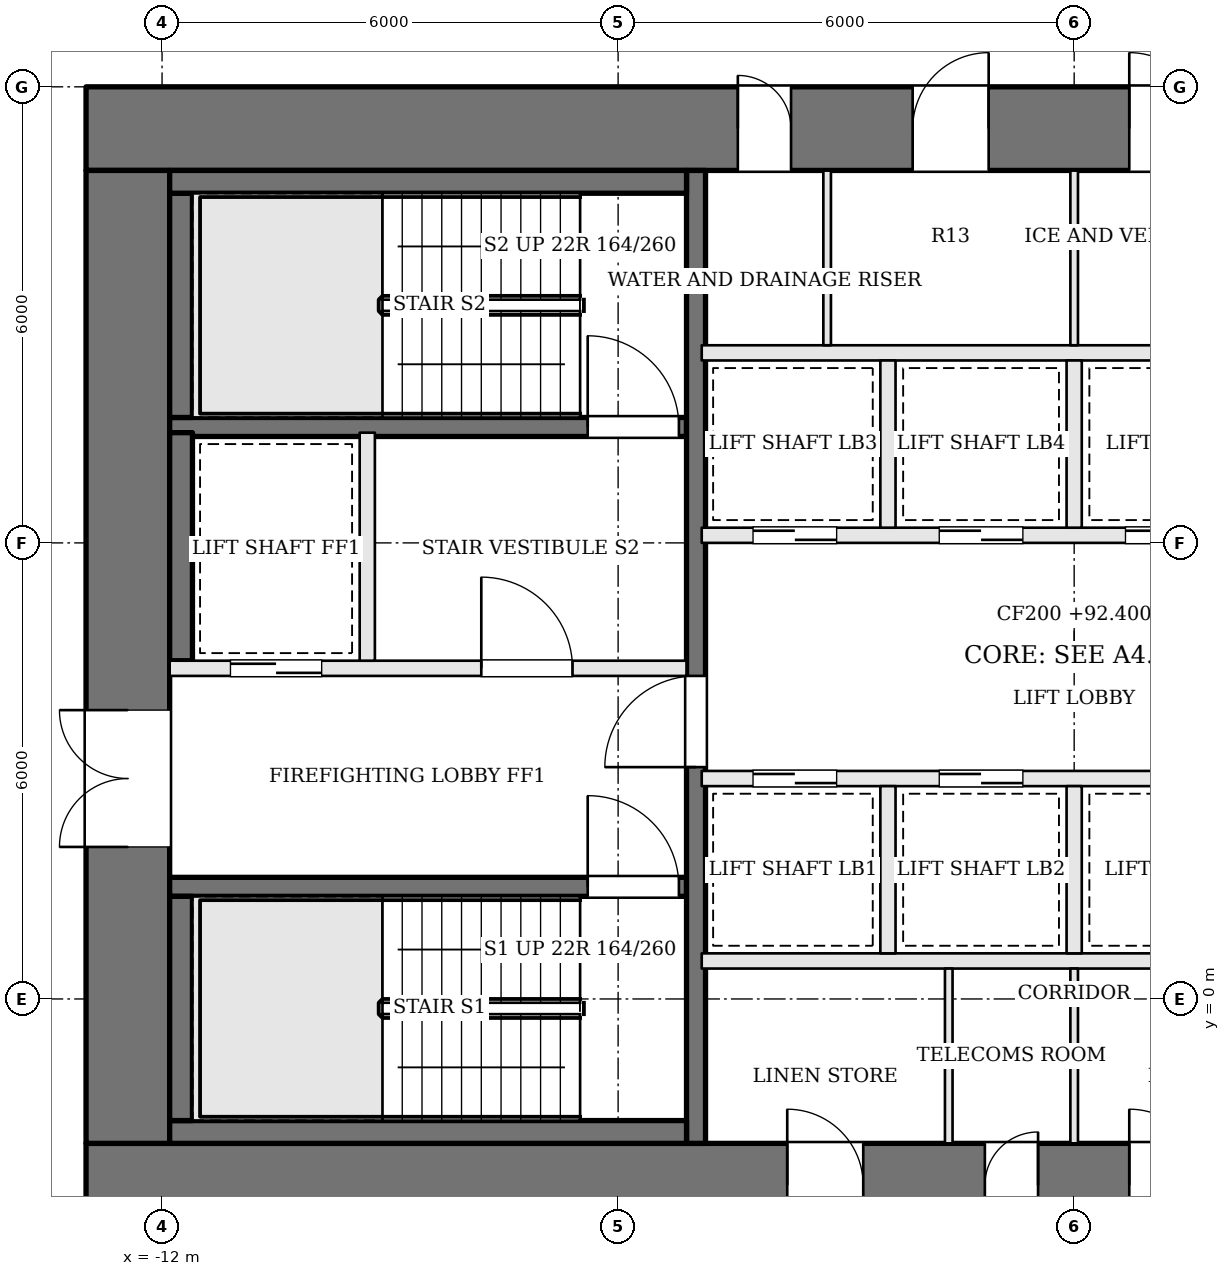
"""IFC4 building model, lengths in metres.
Left out: names, types, materials, properties, quantities, classifications, styles, units other than length and angle.
Written with IfcOpenShell. Run it as: python <this file> out.ifc"""

import sys

from ifc_helpers import new_model, si_unit, direction, frame, frame_2d, origin, place, context, subcontext, project, spatial, rectangle, extrude, element, fill, save


model = new_model("IFC4")
c1 = context("Model", 3, precision=1e-05, world=origin(), true_north=direction((0.0, 1.0)))
c2 = subcontext(c1, "Body", "Model", "MODEL_VIEW")
j1 = project(units=[si_unit("LENGTHUNIT", "METRE"), si_unit("PLANEANGLEUNIT", "RADIAN")], contexts=[c1])
p1 = place(None, origin())
s1 = spatial("IfcSite", under=j1, at=p1, CompositionType="ELEMENT")
p2 = place(p1, origin())
s2 = spatial("IfcBuilding", under=s1, at=p2, CompositionType="ELEMENT")
p3 = place(p2, frame((0.0, 0.0, 92.4)))
s3 = spatial("IfcBuildingStorey", under=s2, at=p3, CompositionType="ELEMENT", Elevation=92.4)
p4 = place(p3, frame((-13.0, 11.45, 0.0), z_axis=(0.0, 0.0, 1.0), x_axis=(1.0, 0.0, 0.0)))
e1 = element("IfcWall", 1, at=p4, inside=s3, PredefinedType="SHEAR", context=c2, shape_type="SweptSolid", body=[
    extrude(rectangle(XDim=26.0, YDim=1.1, at=frame_2d((13.0, 0.0))), origin(), (0.0, 0.0, 1.0), 3.6),
])
p5 = place(p4, frame((8.575, 0.0, 0.0)))
e2 = element("IfcOpeningElement", 2, at=p5, cuts=e1, PredefinedType="OPENING", context=c2, shape_type="SweptSolid", body=[
    extrude(rectangle(XDim=0.7, YDim=2.1, at=frame_2d((0.35, 1.05))), frame((0.0, 0.56, 0.0), z_axis=(0.0, -1.0, 0.0), x_axis=(1.0, 0.0, 0.0)), (0.0, 0.0, 1.0), 1.12),
])
p6 = place(p4, frame((10.875, 0.0, 0.0)))
e3 = element("IfcOpeningElement", 3, at=p6, cuts=e1, PredefinedType="OPENING", context=c2, shape_type="SweptSolid", body=[
    extrude(rectangle(XDim=1.0, YDim=2.1, at=frame_2d((0.5, 1.05))), frame((0.0, 0.56, 0.0), z_axis=(0.0, -1.0, 0.0), x_axis=(1.0, 0.0, 0.0)), (0.0, 0.0, 1.0), 1.12),
])
p7 = place(p4, frame((13.725, 0.0, 0.0)))
e4 = element("IfcOpeningElement", 4, at=p7, cuts=e1, PredefinedType="OPENING", context=c2, shape_type="SweptSolid", body=[
    extrude(rectangle(XDim=1.0, YDim=2.1, at=frame_2d((0.5, 1.05))), frame((0.0, 0.56, 0.0), z_axis=(0.0, -1.0, 0.0), x_axis=(1.0, 0.0, 0.0)), (0.0, 0.0, 1.0), 1.12),
])
p8 = place(p4, frame((16.175, 0.0, 0.0)))
e5 = element("IfcOpeningElement", 5, at=p8, cuts=e1, PredefinedType="OPENING", context=c2, shape_type="SweptSolid", body=[
    extrude(rectangle(XDim=1.0, YDim=2.1, at=frame_2d((0.5, 1.05))), frame((0.0, 0.56, 0.0), z_axis=(0.0, -1.0, 0.0), x_axis=(1.0, 0.0, 0.0)), (0.0, 0.0, 1.0), 1.12),
])
p9 = place(p3, frame((-13.0, -2.45, 0.0), z_axis=(0.0, 0.0, 1.0), x_axis=(1.0, 0.0, 0.0)))
e6 = element("IfcWall", 6, at=p9, inside=s3, PredefinedType="SHEAR", context=c2, shape_type="SweptSolid", body=[
    extrude(rectangle(XDim=26.0, YDim=1.1, at=frame_2d((13.0, 0.0))), origin(), (0.0, 0.0, 1.0), 3.6),
])
p10 = place(p9, frame((9.225, 0.0, 0.0)))
e7 = element("IfcOpeningElement", 7, at=p10, cuts=e6, PredefinedType="OPENING", context=c2, shape_type="SweptSolid", body=[
    extrude(rectangle(XDim=1.0, YDim=2.1, at=frame_2d((0.5, 1.05))), frame((0.0, 0.56, 0.0), z_axis=(0.0, -1.0, 0.0), x_axis=(1.0, 0.0, 0.0)), (0.0, 0.0, 1.0), 1.12),
])
p11 = place(p9, frame((11.825, 0.0, 0.0)))
e8 = element("IfcOpeningElement", 8, at=p11, cuts=e6, PredefinedType="OPENING", context=c2, shape_type="SweptSolid", body=[
    extrude(rectangle(XDim=0.7, YDim=2.1, at=frame_2d((0.35, 1.05))), frame((0.0, 0.56, 0.0), z_axis=(0.0, -1.0, 0.0), x_axis=(1.0, 0.0, 0.0)), (0.0, 0.0, 1.0), 1.12),
])
p12 = place(p9, frame((13.725, 0.0, 0.0)))
e9 = element("IfcOpeningElement", 9, at=p12, cuts=e6, PredefinedType="OPENING", context=c2, shape_type="SweptSolid", body=[
    extrude(rectangle(XDim=1.0, YDim=2.1, at=frame_2d((0.5, 1.05))), frame((0.0, 0.56, 0.0), z_axis=(0.0, -1.0, 0.0), x_axis=(1.0, 0.0, 0.0)), (0.0, 0.0, 1.0), 1.12),
])
p13 = place(p9, frame((16.225, 0.0, 0.0)))
e10 = element("IfcOpeningElement", 10, at=p13, cuts=e6, PredefinedType="OPENING", context=c2, shape_type="SweptSolid", body=[
    extrude(rectangle(XDim=0.9, YDim=2.1, at=frame_2d((0.45, 1.05))), frame((0.0, 0.56, 0.0), z_axis=(0.0, -1.0, 0.0), x_axis=(1.0, 0.0, 0.0)), (0.0, 0.0, 1.0), 1.12),
])
p14 = place(p3, frame((-12.45, -1.9, 0.0), z_axis=(0.0, 0.0, 1.0), x_axis=(0.0, 1.0, 0.0)))
e11 = element("IfcWall", 11, at=p14, inside=s3, PredefinedType="SHEAR", context=c2, shape_type="SweptSolid", body=[
    extrude(rectangle(XDim=12.8, YDim=1.1, at=frame_2d((6.4, 0.0))), origin(), (0.0, 0.0, 1.0), 3.6),
])
p15 = place(p14, frame((3.9, 0.0, 0.0)))
e12 = element("IfcOpeningElement", 12, at=p15, cuts=e11, PredefinedType="OPENING", context=c2, shape_type="SweptSolid", body=[
    extrude(rectangle(XDim=1.8, YDim=2.1, at=frame_2d((0.9, 1.05))), frame((0.0, 0.56, 0.0), z_axis=(0.0, -1.0, 0.0), x_axis=(1.0, 0.0, 0.0)), (0.0, 0.0, 1.0), 1.12),
])
p16 = place(p3, frame((-11.9, 1.475, 0.0), z_axis=(0.0, 0.0, 1.0), x_axis=(1.0, 0.0, 0.0)))
e13 = element("IfcWall", 13, at=p16, inside=s3, PredefinedType="SOLIDWALL", context=c2, shape_type="SweptSolid", body=[
    extrude(rectangle(XDim=6.8, YDim=0.25, at=frame_2d((3.4, 0.0))), origin(), (0.0, 0.0, 1.0), 3.4),
])
p17 = place(p16, frame((5.5, 0.0, 0.0)))
e14 = element("IfcOpeningElement", 14, at=p17, cuts=e13, PredefinedType="OPENING", context=c2, shape_type="SweptSolid", body=[
    extrude(rectangle(XDim=1.2, YDim=2.1, at=frame_2d((0.6, 1.05))), frame((0.0, 0.135, 0.0), z_axis=(0.0, -1.0, 0.0), x_axis=(1.0, 0.0, 0.0)), (0.0, 0.0, 1.0), 0.27),
])
p18 = place(p3, frame((-11.9, 4.35, 0.0), z_axis=(0.0, 0.0, 1.0), x_axis=(1.0, 0.0, 0.0)))
e15 = element("IfcWall", 15, at=p18, inside=s3, PredefinedType="SOLIDWALL", context=c2, shape_type="SweptSolid", body=[
    extrude(rectangle(XDim=6.8, YDim=0.2, at=frame_2d((3.4, 0.0))), origin(), (0.0, 0.0, 1.0), 3.4),
])
p19 = place(p18, frame((4.1, 0.0, 0.0)))
e16 = element("IfcOpeningElement", 16, at=p19, cuts=e15, PredefinedType="OPENING", context=c2, shape_type="SweptSolid", body=[
    extrude(rectangle(XDim=1.2, YDim=2.1, at=frame_2d((0.6, 1.05))), frame((0.0, 0.11, 0.0), z_axis=(0.0, -1.0, 0.0), x_axis=(1.0, 0.0, 0.0)), (0.0, 0.0, 1.0), 0.22),
])
p20 = place(p18, frame((0.8, 0.0, 0.0)))
e17 = element("IfcOpeningElement", 17, at=p20, cuts=e15, PredefinedType="OPENING", context=c2, shape_type="SweptSolid", body=[
    extrude(rectangle(XDim=1.2, YDim=2.1, at=frame_2d((0.6, 1.05))), frame((0.0, 0.11, 0.0), z_axis=(0.0, -1.0, 0.0), x_axis=(1.0, 0.0, 0.0)), (0.0, 0.0, 1.0), 0.22),
])
p21 = place(p3, frame((-11.9, 7.525, 0.0), z_axis=(0.0, 0.0, 1.0), x_axis=(1.0, 0.0, 0.0)))
e18 = element("IfcWall", 18, at=p21, inside=s3, PredefinedType="SOLIDWALL", context=c2, shape_type="SweptSolid", body=[
    extrude(rectangle(XDim=6.8, YDim=0.25, at=frame_2d((3.4, 0.0))), origin(), (0.0, 0.0, 1.0), 3.4),
])
p22 = place(p21, frame((5.5, 0.0, 0.0)))
e19 = element("IfcOpeningElement", 19, at=p22, cuts=e18, PredefinedType="OPENING", context=c2, shape_type="SweptSolid", body=[
    extrude(rectangle(XDim=1.2, YDim=2.1, at=frame_2d((0.6, 1.05))), frame((0.0, 0.135, 0.0), z_axis=(0.0, -1.0, 0.0), x_axis=(1.0, 0.0, 0.0)), (0.0, 0.0, 1.0), 0.27),
])
p23 = place(p3, frame((-9.3, 4.45, 0.0), z_axis=(0.0, 0.0, 1.0), x_axis=(0.0, 1.0, 0.0)))
e20 = element("IfcWall", 20, at=p23, inside=s3, PredefinedType="SOLIDWALL", context=c2, shape_type="SweptSolid", body=[
    extrude(rectangle(XDim=3.0, YDim=0.2, at=frame_2d((1.5, 0.0))), origin(), (0.0, 0.0, 1.0), 3.4),
])
p24 = place(p3, frame((-4.975, -1.9, 0.0), z_axis=(0.0, 0.0, 1.0), x_axis=(0.0, 1.0, 0.0)))
e21 = element("IfcWall", 21, at=p24, inside=s3, PredefinedType="SOLIDWALL", context=c2, shape_type="SweptSolid", body=[
    extrude(rectangle(XDim=12.8, YDim=0.25, at=frame_2d((6.4, 0.0))), origin(), (0.0, 0.0, 1.0), 3.4),
])
p25 = place(p24, frame((4.95, 0.0, 0.0)))
e22 = element("IfcOpeningElement", 22, at=p25, cuts=e21, PredefinedType="OPENING", context=c2, shape_type="SweptSolid", body=[
    extrude(rectangle(XDim=1.2, YDim=2.1, at=frame_2d((0.6, 1.05))), frame((0.0, 0.135, 0.0), z_axis=(0.0, -1.0, 0.0), x_axis=(1.0, 0.0, 0.0)), (0.0, 0.0, 1.0), 0.27),
])
p26 = place(p3, frame((-11.9, -1.75, 0.0), z_axis=(0.0, 0.0, 1.0), x_axis=(1.0, 0.0, 0.0)))
e23 = element("IfcWall", 23, at=p26, inside=s3, PredefinedType="SOLIDWALL", context=c2, shape_type="SweptSolid", body=[
    extrude(rectangle(XDim=6.8, YDim=0.3, at=frame_2d((3.4, 0.0))), origin(), (0.0, 0.0, 1.0), 3.4),
])
p27 = place(p3, frame((-11.75, -1.6, 0.0), z_axis=(0.0, 0.0, 1.0), x_axis=(0.0, 1.0, 0.0)))
e24 = element("IfcWall", 24, at=p27, inside=s3, PredefinedType="SOLIDWALL", context=c2, shape_type="SweptSolid", body=[
    extrude(rectangle(XDim=2.95, YDim=0.3, at=frame_2d((1.475, 0.0))), origin(), (0.0, 0.0, 1.0), 3.4),
])
p28 = place(p3, frame((-11.75, 4.45, 0.0), z_axis=(0.0, 0.0, 1.0), x_axis=(0.0, 1.0, 0.0)))
e25 = element("IfcWall", 25, at=p28, inside=s3, PredefinedType="SOLIDWALL", context=c2, shape_type="SweptSolid", body=[
    extrude(rectangle(XDim=3.0, YDim=0.3, at=frame_2d((1.5, 0.0))), origin(), (0.0, 0.0, 1.0), 3.4),
])
p29 = place(p3, frame((-11.75, 7.65, 0.0), z_axis=(0.0, 0.0, 1.0), x_axis=(0.0, 1.0, 0.0)))
e26 = element("IfcWall", 26, at=p29, inside=s3, PredefinedType="SOLIDWALL", context=c2, shape_type="SweptSolid", body=[
    extrude(rectangle(XDim=2.95, YDim=0.3, at=frame_2d((1.475, 0.0))), origin(), (0.0, 0.0, 1.0), 3.4),
])
p30 = place(p3, frame((-11.9, 10.75, 0.0), z_axis=(0.0, 0.0, 1.0), x_axis=(1.0, 0.0, 0.0)))
e27 = element("IfcWall", 27, at=p30, inside=s3, PredefinedType="SOLIDWALL", context=c2, shape_type="SweptSolid", body=[
    extrude(rectangle(XDim=6.8, YDim=0.3, at=frame_2d((3.4, 0.0))), origin(), (0.0, 0.0, 1.0), 3.4),
])
p31 = place(p3, frame((-4.9, 0.5, 0.0), z_axis=(0.0, 0.0, 1.0), x_axis=(1.0, 0.0, 0.0)))
e28 = element("IfcWall", 28, at=p31, inside=s3, PredefinedType="SOLIDWALL", context=c2, shape_type="SweptSolid", body=[
    extrude(rectangle(XDim=9.8, YDim=0.2, at=frame_2d((4.9, 0.0))), origin(), (0.0, 0.0, 1.0), 3.4),
])
p32 = place(p3, frame((-4.9, 2.9, 0.0), z_axis=(0.0, 0.0, 1.0), x_axis=(1.0, 0.0, 0.0)))
e29 = element("IfcWall", 29, at=p32, inside=s3, PredefinedType="SOLIDWALL", context=c2, shape_type="SweptSolid", body=[
    extrude(rectangle(XDim=9.8, YDim=0.2, at=frame_2d((4.9, 0.0))), origin(), (0.0, 0.0, 1.0), 3.4),
])
p33 = place(p32, frame((0.675, 0.0, 0.0)))
e30 = element("IfcOpeningElement", 30, at=p33, cuts=e29, PredefinedType="OPENING", context=c2, shape_type="SweptSolid", body=[
    extrude(rectangle(XDim=1.1, YDim=2.1, at=frame_2d((0.55, 1.05))), frame((0.0, 0.11, 0.0), z_axis=(0.0, -1.0, 0.0), x_axis=(1.0, 0.0, 0.0)), (0.0, 0.0, 1.0), 0.22),
])
p34 = place(p32, frame((3.125, 0.0, 0.0)))
e31 = element("IfcOpeningElement", 31, at=p34, cuts=e29, PredefinedType="OPENING", context=c2, shape_type="SweptSolid", body=[
    extrude(rectangle(XDim=1.1, YDim=2.1, at=frame_2d((0.55, 1.05))), frame((0.0, 0.11, 0.0), z_axis=(0.0, -1.0, 0.0), x_axis=(1.0, 0.0, 0.0)), (0.0, 0.0, 1.0), 0.22),
])
p35 = place(p3, frame((-4.9, 6.1, 0.0), z_axis=(0.0, 0.0, 1.0), x_axis=(1.0, 0.0, 0.0)))
e32 = element("IfcWall", 32, at=p35, inside=s3, PredefinedType="SOLIDWALL", context=c2, shape_type="SweptSolid", body=[
    extrude(rectangle(XDim=9.8, YDim=0.2, at=frame_2d((4.9, 0.0))), origin(), (0.0, 0.0, 1.0), 3.4),
])
p36 = place(p35, frame((0.675, 0.0, 0.0)))
e33 = element("IfcOpeningElement", 33, at=p36, cuts=e32, PredefinedType="OPENING", context=c2, shape_type="SweptSolid", body=[
    extrude(rectangle(XDim=1.1, YDim=2.1, at=frame_2d((0.55, 1.05))), frame((0.0, 0.11, 0.0), z_axis=(0.0, -1.0, 0.0), x_axis=(1.0, 0.0, 0.0)), (0.0, 0.0, 1.0), 0.22),
])
p37 = place(p35, frame((3.125, 0.0, 0.0)))
e34 = element("IfcOpeningElement", 34, at=p37, cuts=e32, PredefinedType="OPENING", context=c2, shape_type="SweptSolid", body=[
    extrude(rectangle(XDim=1.1, YDim=2.1, at=frame_2d((0.55, 1.05))), frame((0.0, 0.11, 0.0), z_axis=(0.0, -1.0, 0.0), x_axis=(1.0, 0.0, 0.0)), (0.0, 0.0, 1.0), 0.22),
])
p38 = place(p35, frame((5.575, 0.0, 0.0)))
e35 = element("IfcOpeningElement", 35, at=p38, cuts=e32, PredefinedType="OPENING", context=c2, shape_type="SweptSolid", body=[
    extrude(rectangle(XDim=1.1, YDim=2.1, at=frame_2d((0.55, 1.05))), frame((0.0, 0.11, 0.0), z_axis=(0.0, -1.0, 0.0), x_axis=(1.0, 0.0, 0.0)), (0.0, 0.0, 1.0), 0.22),
])
p39 = place(p35, frame((8.025, 0.0, 0.0)))
e36 = element("IfcOpeningElement", 36, at=p39, cuts=e32, PredefinedType="OPENING", context=c2, shape_type="SweptSolid", body=[
    extrude(rectangle(XDim=1.1, YDim=2.1, at=frame_2d((0.55, 1.05))), frame((0.0, 0.11, 0.0), z_axis=(0.0, -1.0, 0.0), x_axis=(1.0, 0.0, 0.0)), (0.0, 0.0, 1.0), 0.22),
])
p40 = place(p3, frame((-4.9, 8.5, 0.0), z_axis=(0.0, 0.0, 1.0), x_axis=(1.0, 0.0, 0.0)))
e37 = element("IfcWall", 37, at=p40, inside=s3, PredefinedType="SOLIDWALL", context=c2, shape_type="SweptSolid", body=[
    extrude(rectangle(XDim=9.8, YDim=0.2, at=frame_2d((4.9, 0.0))), origin(), (0.0, 0.0, 1.0), 3.4),
])
for number, where, z_axis, x_axis in (
    (38, (-2.45, 0.6, 0.0), (0.0, 0.0, 1.0), (0.0, 1.0, 0.0)),
    (39, (0.0, 0.6, 0.0), (0.0, 0.0, 1.0), (0.0, 1.0, 0.0)),
    (40, (-2.45, 6.2, 0.0), (0.0, 0.0, 1.0), (0.0, 1.0, 0.0)),
    (41, (0.0, 6.2, 0.0), (0.0, 0.0, 1.0), (0.0, 1.0, 0.0)),
):
    element("IfcWall", number, at=place(p3, frame(where, z_axis=z_axis, x_axis=x_axis)), inside=s3, PredefinedType="SOLIDWALL", context=c2, shape_type="SweptSolid", body=[
        extrude(rectangle(XDim=2.2, YDim=0.2, at=frame_2d((1.1, 0.0))), origin(), (0.0, 0.0, 1.0), 3.4),
    ])
for number, where, z_axis, x_axis in (
    (42, (-1.65, -1.9, 0.0), (0.0, 0.0, 1.0), (0.0, 1.0, 0.0)),
    (43, (0.0, -1.9, 0.0), (0.0, 0.0, 1.0), (0.0, 1.0, 0.0)),
    (44, (-3.25, 8.6, 0.0), (0.0, 0.0, 1.0), (0.0, 1.0, 0.0)),
    (45, (0.0, 8.6, 0.0), (0.0, 0.0, 1.0), (0.0, 1.0, 0.0)),
):
    element("IfcWall", number, at=place(p3, frame(where, z_axis=z_axis, x_axis=x_axis)), inside=s3, PredefinedType="PARTITIONING", context=c2, shape_type="SweptSolid", body=[
        extrude(rectangle(XDim=2.3, YDim=0.1, at=frame_2d((1.15, 0.0))), origin(), (0.0, 0.0, 1.0), 3.4),
    ])
p41 = place(p15, origin())
e46 = element("IfcDoor", 46, at=p41, inside=s3, OperationType="DOUBLE_DOOR_SINGLE_SWING", PredefinedType="DOOR", context=c2, shape_type="SweptSolid", body=[
    extrude(rectangle(XDim=1.8, YDim=2.1, at=frame_2d((0.9, 1.05))), frame((0.0, 0.025, 0.0), z_axis=(0.0, -1.0, 0.0), x_axis=(1.0, 0.0, 0.0)), (0.0, 0.0, 1.0), 0.05),
])
fill(e12, e46)
p42 = place(p25, origin())
e47 = element("IfcDoor", 47, at=p42, inside=s3, OperationType="SINGLE_SWING_LEFT", PredefinedType="DOOR", context=c2, shape_type="SweptSolid", body=[
    extrude(rectangle(XDim=1.2, YDim=2.1, at=frame_2d((0.6, 1.05))), frame((0.0, 0.025, 0.0), z_axis=(0.0, -1.0, 0.0), x_axis=(1.0, 0.0, 0.0)), (0.0, 0.0, 1.0), 0.05),
])
fill(e22, e47)
p43 = place(p19, origin())
e48 = element("IfcDoor", 48, at=p43, inside=s3, OperationType="SINGLE_SWING_LEFT", PredefinedType="DOOR", context=c2, shape_type="SweptSolid", body=[
    extrude(rectangle(XDim=1.2, YDim=2.1, at=frame_2d((0.6, 1.05))), frame((0.0, 0.025, 0.0), z_axis=(0.0, -1.0, 0.0), x_axis=(1.0, 0.0, 0.0)), (0.0, 0.0, 1.0), 0.05),
])
fill(e16, e48)
p44 = place(p17, origin())
e49 = element("IfcDoor", 49, at=p44, inside=s3, OperationType="SINGLE_SWING_LEFT", PredefinedType="DOOR", context=c2, shape_type="SweptSolid", body=[
    extrude(rectangle(XDim=1.2, YDim=2.1, at=frame_2d((0.6, 1.05))), frame((0.0, 0.025, 0.0), z_axis=(0.0, -1.0, 0.0), x_axis=(1.0, 0.0, 0.0)), (0.0, 0.0, 1.0), 0.05),
])
fill(e14, e49)
p45 = place(p22, origin())
e50 = element("IfcDoor", 50, at=p45, inside=s3, OperationType="SINGLE_SWING_LEFT", PredefinedType="DOOR", context=c2, shape_type="SweptSolid", body=[
    extrude(rectangle(XDim=1.2, YDim=2.1, at=frame_2d((0.6, 1.05))), frame((0.0, 0.025, 0.0), z_axis=(0.0, -1.0, 0.0), x_axis=(1.0, 0.0, 0.0)), (0.0, 0.0, 1.0), 0.05),
])
fill(e19, e50)
p46 = place(p20, origin())
e51 = element("IfcDoor", 51, at=p46, inside=s3, OperationType="SLIDING_TO_RIGHT", PredefinedType="DOOR", context=c2, shape_type="SweptSolid", body=[
    extrude(rectangle(XDim=1.2, YDim=2.1, at=frame_2d((0.6, 1.05))), frame((0.0, 0.025, 0.0), z_axis=(0.0, -1.0, 0.0), x_axis=(1.0, 0.0, 0.0)), (0.0, 0.0, 1.0), 0.05),
])
fill(e17, e51)
p47 = place(p33, origin())
e52 = element("IfcDoor", 52, at=p47, inside=s3, OperationType="SLIDING_TO_RIGHT", PredefinedType="DOOR", context=c2, shape_type="SweptSolid", body=[
    extrude(rectangle(XDim=1.1, YDim=2.1, at=frame_2d((0.55, 1.05))), frame((0.0, 0.025, 0.0), z_axis=(0.0, -1.0, 0.0), x_axis=(1.0, 0.0, 0.0)), (0.0, 0.0, 1.0), 0.05),
])
fill(e30, e52)
p48 = place(p34, origin())
e53 = element("IfcDoor", 53, at=p48, inside=s3, OperationType="SLIDING_TO_LEFT", PredefinedType="DOOR", context=c2, shape_type="SweptSolid", body=[
    extrude(rectangle(XDim=1.1, YDim=2.1, at=frame_2d((0.55, 1.05))), frame((0.0, 0.025, 0.0), z_axis=(0.0, -1.0, 0.0), x_axis=(1.0, 0.0, 0.0)), (0.0, 0.0, 1.0), 0.05),
])
fill(e31, e53)
p49 = place(p36, origin())
e54 = element("IfcDoor", 54, at=p49, inside=s3, OperationType="SLIDING_TO_RIGHT", PredefinedType="DOOR", context=c2, shape_type="SweptSolid", body=[
    extrude(rectangle(XDim=1.1, YDim=2.1, at=frame_2d((0.55, 1.05))), frame((0.0, 0.025, 0.0), z_axis=(0.0, -1.0, 0.0), x_axis=(1.0, 0.0, 0.0)), (0.0, 0.0, 1.0), 0.05),
])
fill(e33, e54)
p50 = place(p37, origin())
e55 = element("IfcDoor", 55, at=p50, inside=s3, OperationType="SLIDING_TO_LEFT", PredefinedType="DOOR", context=c2, shape_type="SweptSolid", body=[
    extrude(rectangle(XDim=1.1, YDim=2.1, at=frame_2d((0.55, 1.05))), frame((0.0, 0.025, 0.0), z_axis=(0.0, -1.0, 0.0), x_axis=(1.0, 0.0, 0.0)), (0.0, 0.0, 1.0), 0.05),
])
fill(e34, e55)
p51 = place(p38, origin())
e56 = element("IfcDoor", 56, at=p51, inside=s3, OperationType="SLIDING_TO_RIGHT", PredefinedType="DOOR", context=c2, shape_type="SweptSolid", body=[
    extrude(rectangle(XDim=1.1, YDim=2.1, at=frame_2d((0.55, 1.05))), frame((0.0, 0.025, 0.0), z_axis=(0.0, -1.0, 0.0), x_axis=(1.0, 0.0, 0.0)), (0.0, 0.0, 1.0), 0.05),
])
fill(e35, e56)
p52 = place(p10, origin())
e57 = element("IfcDoor", 57, at=p52, inside=s3, OperationType="SINGLE_SWING_LEFT", PredefinedType="DOOR", context=c2, shape_type="SweptSolid", body=[
    extrude(rectangle(XDim=1.0, YDim=2.1, at=frame_2d((0.5, 1.05))), frame((0.0, 0.025, 0.0), z_axis=(0.0, -1.0, 0.0), x_axis=(1.0, 0.0, 0.0)), (0.0, 0.0, 1.0), 0.05),
])
fill(e7, e57)
p53 = place(p11, origin())
e58 = element("IfcDoor", 58, at=p53, inside=s3, OperationType="SINGLE_SWING_RIGHT", PredefinedType="DOOR", context=c2, shape_type="SweptSolid", body=[
    extrude(rectangle(XDim=0.7, YDim=2.1, at=frame_2d((0.35, 1.05))), frame((0.0, 0.025, 0.0), z_axis=(0.0, -1.0, 0.0), x_axis=(1.0, 0.0, 0.0)), (0.0, 0.0, 1.0), 0.05),
])
fill(e8, e58)
p54 = place(p12, origin())
e59 = element("IfcDoor", 59, at=p54, inside=s3, OperationType="SINGLE_SWING_LEFT", PredefinedType="DOOR", context=c2, shape_type="SweptSolid", body=[
    extrude(rectangle(XDim=1.0, YDim=2.1, at=frame_2d((0.5, 1.05))), frame((0.0, 0.025, 0.0), z_axis=(0.0, -1.0, 0.0), x_axis=(1.0, 0.0, 0.0)), (0.0, 0.0, 1.0), 0.05),
])
fill(e9, e59)
p55 = place(p5, origin())
e60 = element("IfcDoor", 60, at=p55, inside=s3, OperationType="SINGLE_SWING_LEFT", PredefinedType="DOOR", context=c2, shape_type="SweptSolid", body=[
    extrude(rectangle(XDim=0.7, YDim=2.1, at=frame_2d((0.35, 1.05))), frame((0.0, 0.025, 0.0), z_axis=(0.0, -1.0, 0.0), x_axis=(1.0, 0.0, 0.0)), (0.0, 0.0, 1.0), 0.05),
])
fill(e2, e60)
p56 = place(p6, origin())
e61 = element("IfcDoor", 61, at=p56, inside=s3, OperationType="SINGLE_SWING_RIGHT", PredefinedType="DOOR", context=c2, shape_type="SweptSolid", body=[
    extrude(rectangle(XDim=1.0, YDim=2.1, at=frame_2d((0.5, 1.05))), frame((0.0, 0.025, 0.0), z_axis=(0.0, -1.0, 0.0), x_axis=(1.0, 0.0, 0.0)), (0.0, 0.0, 1.0), 0.05),
])
fill(e3, e61)
p57 = place(p7, origin())
e62 = element("IfcDoor", 62, at=p57, inside=s3, OperationType="SINGLE_SWING_LEFT", PredefinedType="DOOR", context=c2, shape_type="SweptSolid", body=[
    extrude(rectangle(XDim=1.0, YDim=2.1, at=frame_2d((0.5, 1.05))), frame((0.0, 0.025, 0.0), z_axis=(0.0, -1.0, 0.0), x_axis=(1.0, 0.0, 0.0)), (0.0, 0.0, 1.0), 0.05),
])
fill(e4, e62)
save(model, sys.argv[1])
